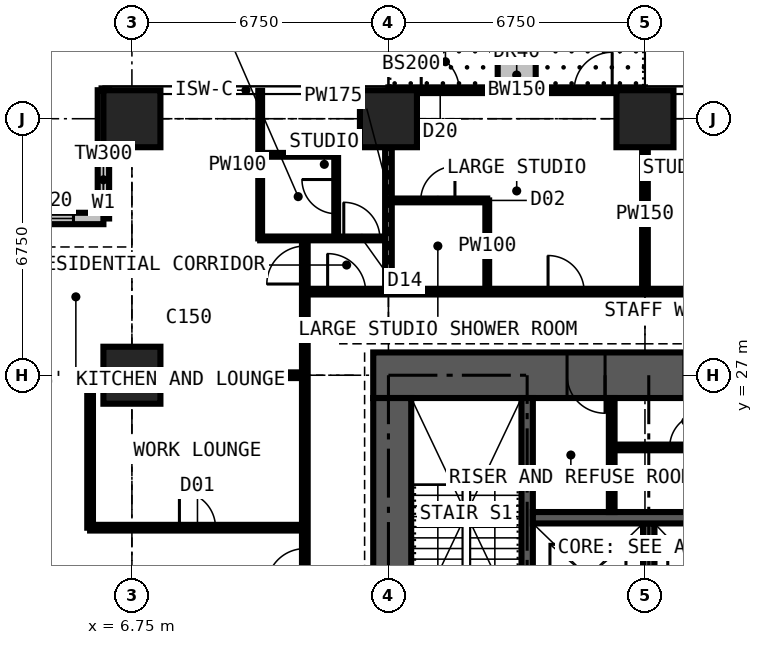
"""IFC4 building model, lengths in metres.
Left out: names, types, materials, properties, quantities, classifications, styles, units other than length and angle.
Written with IfcOpenShell. Run it as: python <this file> out.ifc"""

import sys

from ifc_helpers import new_model, si_unit, direction, frame, frame_2d, origin, origin_2d, place, context, subcontext, project, spatial, rectangle, extrude, element, fill, save


model = new_model("IFC4")
c1 = context("Model", 3, precision=1e-05, world=origin(), true_north=direction((0.0, 1.0)))
c2 = subcontext(c1, "Body", "Model", "MODEL_VIEW")
j1 = project(units=[si_unit("LENGTHUNIT", "METRE"), si_unit("PLANEANGLEUNIT", "RADIAN")], contexts=[c1])
p1 = place(None, origin())
s1 = spatial("IfcSite", under=j1, at=p1, CompositionType="ELEMENT")
p2 = place(p1, origin())
s2 = spatial("IfcBuilding", under=s1, at=p2, CompositionType="ELEMENT")
p3 = place(p2, frame((0.0, 0.0, 149.4)))
s3 = spatial("IfcBuildingStorey", under=s2, at=p3, CompositionType="ELEMENT", Elevation=149.4)
for number, where, z_axis, x_axis in (
    (1, (6.75, 27.0, 0.0), (0.0, 0.0, 1.0), (1.0, 0.0, 0.0)),
    (2, (6.75, 33.75, 0.0), (0.0, 0.0, 1.0), (1.0, 0.0, 0.0)),
    (3, (13.5, 33.75, 0.0), (0.0, 0.0, 1.0), (1.0, 0.0, 0.0)),
    (4, (20.25, 33.75, 0.0), (0.0, 0.0, 1.0), (1.0, 0.0, 0.0)),
):
    element("IfcColumn", number, at=place(p3, frame(where, z_axis=z_axis, x_axis=x_axis)), inside=s3, PredefinedType="COLUMN", context=c2, shape_type="SweptSolid", body=[
        extrude(rectangle(XDim=1.5, YDim=1.5, at=origin_2d()), origin(), (0.0, 0.0, 1.0), 3.6),
    ])
p4 = place(p3, frame((27.4, 27.0, 0.0), z_axis=(0.0, 0.0, 1.0), x_axis=(-1.0, 0.0, 0.0)))
e5 = element("IfcWall", 5, at=p4, inside=s3, PredefinedType="SHEAR", context=c2, shape_type="SweptSolid", body=[
    extrude(rectangle(XDim=14.3, YDim=1.2, at=frame_2d((7.15, 0.0))), origin(), (0.0, 0.0, 1.0), 3.6),
])
p5 = place(p4, frame((5.225, 0.0, 0.0)))
e6 = element("IfcOpeningElement", 6, at=p5, cuts=e5, PredefinedType="OPENING", context=c2, shape_type="SweptSolid", body=[
    extrude(rectangle(XDim=0.9, YDim=2.2, at=frame_2d((0.45, 1.1))), frame((0.0, 0.61, 0.0), z_axis=(0.0, -1.0, 0.0), x_axis=(1.0, 0.0, 0.0)), (0.0, 0.0, 1.0), 1.22),
])
p6 = place(p4, frame((8.2, 0.0, 0.0)))
e7 = element("IfcOpeningElement", 7, at=p6, cuts=e5, PredefinedType="OPENING", context=c2, shape_type="SweptSolid", body=[
    extrude(rectangle(XDim=1.0, YDim=2.2, at=frame_2d((0.5, 1.1))), frame((0.0, 0.61, 0.0), z_axis=(0.0, -1.0, 0.0), x_axis=(1.0, 0.0, 0.0)), (0.0, 0.0, 1.0), 1.22),
])
p7 = place(p3, frame((13.6, 26.4, 0.0), z_axis=(0.0, 0.0, 1.0), x_axis=(0.0, -1.0, 0.0)))
e8 = element("IfcWall", 8, at=p7, inside=s3, PredefinedType="SHEAR", context=c2, shape_type="SweptSolid", body=[
    extrude(rectangle(XDim=12.3, YDim=1.0, at=frame_2d((6.15, 0.0))), origin(), (0.0, 0.0, 1.0), 3.6),
])
p8 = place(p7, frame((7.45, 0.0, 0.0)))
e9 = element("IfcOpeningElement", 9, at=p8, cuts=e8, PredefinedType="OPENING", context=c2, shape_type="SweptSolid", body=[
    extrude(rectangle(XDim=1.2, YDim=2.2, at=frame_2d((0.6, 1.1))), frame((0.0, 0.51, 0.0), z_axis=(0.0, -1.0, 0.0), x_axis=(1.0, 0.0, 0.0)), (0.0, 0.0, 1.0), 1.02),
])
p9 = place(p3, frame((13.5, 34.5, 0.0), z_axis=(0.0, 0.0, 1.0), x_axis=(1.0, 0.0, 0.0)))
e10 = element("IfcWall", 10, at=p9, inside=s3, PredefinedType="SOLIDWALL", context=c2, shape_type="SweptSolid", body=[
    extrude(rectangle(XDim=6.75, YDim=0.15, at=frame_2d((3.375, 0.0))), origin(), (0.0, 0.0, 1.0), 3.375),
])
p10 = place(p9, frame((0.863, 0.0, 0.0)))
e11 = element("IfcOpeningElement", 11, at=p10, cuts=e10, PredefinedType="OPENING", context=c2, shape_type="SweptSolid", body=[
    extrude(rectangle(XDim=1.0, YDim=2.2, at=frame_2d((0.5, 1.1))), frame((0.0, 0.085, 0.0), z_axis=(0.0, -1.0, 0.0), x_axis=(1.0, 0.0, 0.0)), (0.0, 0.0, 1.0), 0.17),
])
p11 = place(p9, frame((1.975, 0.0, 0.9)))
e12 = element("IfcOpeningElement", 12, at=p11, cuts=e10, PredefinedType="OPENING", context=c2, shape_type="SweptSolid", body=[
    extrude(rectangle(XDim=1.2, YDim=1.8, at=frame_2d((0.6, 0.9))), frame((0.0, 0.085, 0.0), z_axis=(0.0, -1.0, 0.0), x_axis=(1.0, 0.0, 0.0)), (0.0, 0.0, 1.0), 0.17),
])
p12 = place(p9, frame((4.887, 0.0, 0.0)))
e13 = element("IfcOpeningElement", 13, at=p12, cuts=e10, PredefinedType="OPENING", context=c2, shape_type="SweptSolid", body=[
    extrude(rectangle(XDim=1.0, YDim=2.2, at=frame_2d((0.5, 1.1))), frame((0.0, 0.085, 0.0), z_axis=(0.0, -1.0, 0.0), x_axis=(1.0, 0.0, 0.0)), (0.0, 0.0, 1.0), 0.17),
])
p13 = place(p9, frame((3.575, 0.0, 0.9)))
e14 = element("IfcOpeningElement", 14, at=p13, cuts=e10, PredefinedType="OPENING", context=c2, shape_type="SweptSolid", body=[
    extrude(rectangle(XDim=1.2, YDim=1.8, at=frame_2d((0.6, 0.9))), frame((0.0, 0.085, 0.0), z_axis=(0.0, -1.0, 0.0), x_axis=(1.0, 0.0, 0.0)), (0.0, 0.0, 1.0), 0.17),
])
p14 = place(p3, frame((6.0, 34.5, 0.0), z_axis=(0.0, 0.0, 1.0), x_axis=(0.0, -1.0, 0.0)))
e15 = element("IfcWall", 15, at=p14, inside=s3, PredefinedType="SOLIDWALL", context=c2, shape_type="SweptSolid", body=[
    extrude(rectangle(XDim=3.375, YDim=0.3, at=frame_2d((1.688, 0.0))), origin(), (0.0, 0.0, 1.0), 3.375),
])
p15 = place(p14, frame((1.607, 0.0, 0.9)))
e16 = element("IfcOpeningElement", 16, at=p15, cuts=e15, PredefinedType="OPENING", context=c2, shape_type="SweptSolid", body=[
    extrude(rectangle(XDim=1.5, YDim=1.8, at=frame_2d((0.75, 0.9))), frame((0.0, 0.16, 0.0), z_axis=(0.0, -1.0, 0.0), x_axis=(1.0, 0.0, 0.0)), (0.0, 0.0, 1.0), 0.32),
])
p16 = place(p3, frame((6.0, 31.125, 0.0), z_axis=(0.0, 0.0, 1.0), x_axis=(-1.0, 0.0, 0.0)))
e17 = element("IfcWall", 17, at=p16, inside=s3, PredefinedType="SOLIDWALL", context=c2, shape_type="SweptSolid", body=[
    extrude(rectangle(XDim=3.375, YDim=0.3, at=frame_2d((1.688, 0.0))), origin(), (0.0, 0.0, 1.0), 3.375),
])
p17 = place(p16, frame((0.788, 0.0, 0.6)))
e18 = element("IfcOpeningElement", 18, at=p17, cuts=e17, PredefinedType="OPENING", context=c2, shape_type="SweptSolid", body=[
    extrude(rectangle(XDim=1.8, YDim=2.1, at=frame_2d((0.9, 1.05))), frame((0.0, 0.16, 0.0), z_axis=(0.0, -1.0, 0.0), x_axis=(1.0, 0.0, 0.0)), (0.0, 0.0, 1.0), 0.32),
])
p18 = place(p3, frame((16.875, 34.6, 0.0), z_axis=(0.0, 0.0, 1.0), x_axis=(0.0, 1.0, 0.0)))
e19 = element("IfcWall", 19, at=p18, inside=s3, PredefinedType="USERDEFINED", context=c2, shape_type="SweptSolid", body=[
    extrude(rectangle(XDim=2.2, YDim=1.0, at=frame_2d((1.1, 0.0))), origin(), (0.0, 0.0, 1.0), 0.9),
])
p19 = place(p3, frame((17.15, 20.3, 0.0), z_axis=(0.0, 0.0, 1.0), x_axis=(0.0, 1.0, 0.0)))
e20 = element("IfcWall", 20, at=p19, inside=s3, PredefinedType="SHEAR", context=c2, shape_type="SweptSolid", body=[
    extrude(rectangle(XDim=6.1, YDim=0.3, at=frame_2d((3.05, 0.0))), origin(), (0.0, 0.0, 1.0), 3.6),
])
p20 = place(p3, frame((20.35, 20.3, 0.0), z_axis=(0.0, 0.0, 1.0), x_axis=(0.0, 1.0, 0.0)))
e21 = element("IfcWall", 21, at=p20, inside=s3, PredefinedType="SHEAR", context=c2, shape_type="SweptSolid", body=[
    extrude(rectangle(XDim=2.8, YDim=0.3, at=frame_2d((1.4, 0.0))), origin(), (0.0, 0.0, 1.0), 3.6),
])
p21 = place(p3, frame((17.3, 23.25, 0.0), z_axis=(0.0, 0.0, 1.0), x_axis=(1.0, 0.0, 0.0)))
e22 = element("IfcWall", 22, at=p21, inside=s3, PredefinedType="SHEAR", context=c2, shape_type="SweptSolid", body=[
    extrude(rectangle(XDim=5.9, YDim=0.3, at=frame_2d((2.95, 0.0))), origin(), (0.0, 0.0, 1.0), 3.6),
])
p22 = place(p3, frame((19.375, 23.4, 0.0), z_axis=(0.0, 0.0, 1.0), x_axis=(0.0, 1.0, 0.0)))
e23 = element("IfcWall", 23, at=p22, inside=s3, PredefinedType="PARTITIONING", context=c2, shape_type="SweptSolid", body=[
    extrude(rectangle(XDim=3.0, YDim=0.15, at=frame_2d((1.5, 0.0))), origin(), (0.0, 0.0, 1.0), 3.375),
])
p23 = place(p3, frame((19.45, 25.1, 0.0), z_axis=(0.0, 0.0, 1.0), x_axis=(1.0, 0.0, 0.0)))
e24 = element("IfcWall", 24, at=p23, inside=s3, PredefinedType="PARTITIONING", context=c2, shape_type="SweptSolid", body=[
    extrude(rectangle(XDim=3.75, YDim=0.15, at=frame_2d((1.875, 0.0))), origin(), (0.0, 0.0, 1.0), 3.375),
])
p24 = place(p23, frame((1.45, 0.0, 0.0)))
e25 = element("IfcOpeningElement", 25, at=p24, cuts=e24, PredefinedType="OPENING", context=c2, shape_type="SweptSolid", body=[
    extrude(rectangle(XDim=0.9, YDim=2.2, at=frame_2d((0.45, 1.1))), frame((0.0, 0.085, 0.0), z_axis=(0.0, -1.0, 0.0), x_axis=(1.0, 0.0, 0.0)), (0.0, 0.0, 1.0), 0.17),
])
p25 = place(p3, frame((4.15, 27.0, 0.0), z_axis=(0.0, 0.0, 1.0), x_axis=(1.0, 0.0, 0.0)))
e26 = element("IfcWall", 26, at=p25, inside=s3, PredefinedType="PARTITIONING", context=c2, shape_type="SweptSolid", body=[
    extrude(rectangle(XDim=7.15, YDim=0.15, at=frame_2d((3.575, 0.0))), origin(), (0.0, 0.0, 1.0), 2.806),
])
p26 = place(p3, frame((5.65, 22.988, 0.0), z_axis=(0.0, 0.0, 1.0), x_axis=(0.0, 1.0, 0.0)))
e27 = element("IfcWall", 27, at=p26, inside=s3, PredefinedType="PARTITIONING", context=c2, shape_type="SweptSolid", body=[
    extrude(rectangle(XDim=4.012, YDim=0.15, at=frame_2d((2.006, 0.0))), origin(), (0.0, 0.0, 1.0), 3.375),
])
p27 = place(p3, frame((5.65, 22.988, 0.0), z_axis=(0.0, 0.0, 1.0), x_axis=(1.0, 0.0, 0.0)))
e28 = element("IfcWall", 28, at=p27, inside=s3, PredefinedType="PARTITIONING", context=c2, shape_type="SweptSolid", body=[
    extrude(rectangle(XDim=5.65, YDim=0.15, at=frame_2d((2.825, 0.0))), origin(), (0.0, 0.0, 1.0), 3.375),
])
p28 = place(p27, frame((2.35, 0.0, 0.0)))
e29 = element("IfcOpeningElement", 29, at=p28, cuts=e28, PredefinedType="OPENING", context=c2, shape_type="SweptSolid", body=[
    extrude(rectangle(XDim=0.95, YDim=2.2, at=frame_2d((0.475, 1.1))), frame((0.0, 0.085, 0.0), z_axis=(0.0, -1.0, 0.0), x_axis=(1.0, 0.0, 0.0)), (0.0, 0.0, 1.0), 0.17),
])
p29 = place(p3, frame((10.125, 30.6, 0.0), z_axis=(0.0, 0.0, 1.0), x_axis=(0.0, 1.0, 0.0)))
e30 = element("IfcWall", 30, at=p29, inside=s3, PredefinedType="PARTITIONING", context=c2, shape_type="SweptSolid", body=[
    extrude(rectangle(XDim=3.884, YDim=0.1, at=frame_2d((1.942, 0.0))), origin(), (0.0, 0.0, 1.0), 3.375),
])
p30 = place(p3, frame((10.125, 30.6, 0.0), z_axis=(0.0, 0.0, 1.0), x_axis=(1.0, 0.0, 0.0)))
e31 = element("IfcWall", 31, at=p30, inside=s3, PredefinedType="PARTITIONING", context=c2, shape_type="SweptSolid", body=[
    extrude(rectangle(XDim=3.375, YDim=0.1, at=frame_2d((1.688, 0.0))), origin(), (0.0, 0.0, 1.0), 3.375),
])
p31 = place(p30, frame((2.2, 0.0, 0.0)))
e32 = element("IfcOpeningElement", 32, at=p31, cuts=e31, PredefinedType="OPENING", context=c2, shape_type="SweptSolid", body=[
    extrude(rectangle(XDim=0.95, YDim=2.2, at=frame_2d((0.475, 1.1))), frame((0.0, 0.06, 0.0), z_axis=(0.0, -1.0, 0.0), x_axis=(1.0, 0.0, 0.0)), (0.0, 0.0, 1.0), 0.12),
])
p32 = place(p3, frame((10.125, 32.8, 0.0), z_axis=(0.0, 0.0, 1.0), x_axis=(1.0, 0.0, 0.0)))
e33 = element("IfcWall", 33, at=p32, inside=s3, PredefinedType="PARTITIONING", context=c2, shape_type="SweptSolid", body=[
    extrude(rectangle(XDim=2.0, YDim=0.1, at=frame_2d((1.0, 0.0))), origin(), (0.0, 0.0, 1.0), 3.375),
])
p33 = place(p3, frame((11.3, 11.3, 0.0), z_axis=(0.0, 0.0, 1.0), x_axis=(0.0, 1.0, 0.0)))
e34 = element("IfcWall", 34, at=p33, inside=s3, PredefinedType="PARTITIONING", context=c2, shape_type="SweptSolid", body=[
    extrude(rectangle(XDim=19.3, YDim=0.15, at=frame_2d((9.65, 0.0))), origin(), (0.0, 0.0, 1.0), 3.375),
])
p34 = place(p33, frame((18.1, 0.0, 0.0)))
e35 = element("IfcOpeningElement", 35, at=p34, cuts=e34, PredefinedType="OPENING", context=c2, shape_type="SweptSolid", body=[
    extrude(rectangle(XDim=1.0, YDim=2.2, at=frame_2d((0.5, 1.1))), frame((0.0, 0.085, 0.0), z_axis=(0.0, -1.0, 0.0), x_axis=(1.0, 0.0, 0.0)), (0.0, 0.0, 1.0), 0.17),
])
p35 = place(p33, frame((10.137, 0.0, 0.0)))
e36 = element("IfcOpeningElement", 36, at=p35, cuts=e34, PredefinedType="OPENING", context=c2, shape_type="SweptSolid", body=[
    extrude(rectangle(XDim=1.0, YDim=2.2, at=frame_2d((0.5, 1.1))), frame((0.0, 0.085, 0.0), z_axis=(0.0, -1.0, 0.0), x_axis=(1.0, 0.0, 0.0)), (0.0, 0.0, 1.0), 0.17),
])
p36 = place(p3, frame((11.3, 29.2, 0.0), z_axis=(0.0, 0.0, 1.0), x_axis=(1.0, 0.0, 0.0)))
e37 = element("IfcWall", 37, at=p36, inside=s3, PredefinedType="PARTITIONING", context=c2, shape_type="SweptSolid", body=[
    extrude(rectangle(XDim=19.809, YDim=0.15, at=frame_2d((9.904, 0.0))), origin(), (0.0, 0.0, 1.0), 3.375),
])
p37 = place(p36, frame((12.9, 0.0, 0.0)))
e38 = element("IfcOpeningElement", 38, at=p37, cuts=e37, PredefinedType="OPENING", context=c2, shape_type="SweptSolid", body=[
    extrude(rectangle(XDim=1.0, YDim=2.2, at=frame_2d((0.5, 1.1))), frame((0.0, 0.085, 0.0), z_axis=(0.0, -1.0, 0.0), x_axis=(1.0, 0.0, 0.0)), (0.0, 0.0, 1.0), 0.17),
])
p38 = place(p36, frame((6.4, 0.0, 0.0)))
e39 = element("IfcOpeningElement", 39, at=p38, cuts=e37, PredefinedType="OPENING", context=c2, shape_type="SweptSolid", body=[
    extrude(rectangle(XDim=0.95, YDim=2.2, at=frame_2d((0.475, 1.1))), frame((0.0, 0.085, 0.0), z_axis=(0.0, -1.0, 0.0), x_axis=(1.0, 0.0, 0.0)), (0.0, 0.0, 1.0), 0.17),
])
p39 = place(p36, frame((0.6, 0.0, 0.0)))
e40 = element("IfcOpeningElement", 40, at=p39, cuts=e37, PredefinedType="OPENING", context=c2, shape_type="SweptSolid", body=[
    extrude(rectangle(XDim=1.0, YDim=2.2, at=frame_2d((0.5, 1.1))), frame((0.0, 0.085, 0.0), z_axis=(0.0, -1.0, 0.0), x_axis=(1.0, 0.0, 0.0)), (0.0, 0.0, 1.0), 0.17),
])
p40 = place(p3, frame((12.125, 30.6, 0.0), z_axis=(0.0, 0.0, 1.0), x_axis=(0.0, 1.0, 0.0)))
e41 = element("IfcWall", 41, at=p40, inside=s3, PredefinedType="PARTITIONING", context=c2, shape_type="SweptSolid", body=[
    extrude(rectangle(XDim=2.2, YDim=0.1, at=frame_2d((1.1, 0.0))), origin(), (0.0, 0.0, 1.0), 3.375),
])
p41 = place(p40, frame((0.65, 0.0, 0.0)))
e42 = element("IfcOpeningElement", 42, at=p41, cuts=e41, PredefinedType="OPENING", context=c2, shape_type="SweptSolid", body=[
    extrude(rectangle(XDim=0.9, YDim=2.2, at=frame_2d((0.45, 1.1))), frame((0.0, 0.06, 0.0), z_axis=(0.0, -1.0, 0.0), x_axis=(1.0, 0.0, 0.0)), (0.0, 0.0, 1.0), 0.12),
])
p42 = place(p3, frame((13.5, 29.2, 0.0), z_axis=(0.0, 0.0, 1.0), x_axis=(0.0, 1.0, 0.0)))
e43 = element("IfcWall", 43, at=p42, inside=s3, PredefinedType="PARTITIONING", context=c2, shape_type="SweptSolid", body=[
    extrude(rectangle(XDim=5.284, YDim=0.175, at=frame_2d((2.642, 0.0))), origin(), (0.0, 0.0, 1.0), 2.806),
])
p43 = place(p3, frame((13.5, 31.6, 0.0), z_axis=(0.0, 0.0, 1.0), x_axis=(1.0, 0.0, 0.0)))
e44 = element("IfcWall", 44, at=p43, inside=s3, PredefinedType="PARTITIONING", context=c2, shape_type="SweptSolid", body=[
    extrude(rectangle(XDim=2.6, YDim=0.1, at=frame_2d((1.3, 0.0))), origin(), (0.0, 0.0, 1.0), 3.375),
])
p44 = place(p43, frame((0.85, 0.0, 0.0)))
e45 = element("IfcOpeningElement", 45, at=p44, cuts=e44, PredefinedType="OPENING", context=c2, shape_type="SweptSolid", body=[
    extrude(rectangle(XDim=0.9, YDim=2.2, at=frame_2d((0.45, 1.1))), frame((0.0, 0.06, 0.0), z_axis=(0.0, -1.0, 0.0), x_axis=(1.0, 0.0, 0.0)), (0.0, 0.0, 1.0), 0.12),
])
p45 = place(p3, frame((16.1, 29.2, 0.0), z_axis=(0.0, 0.0, 1.0), x_axis=(0.0, 1.0, 0.0)))
e46 = element("IfcWall", 46, at=p45, inside=s3, PredefinedType="PARTITIONING", context=c2, shape_type="SweptSolid", body=[
    extrude(rectangle(XDim=2.4, YDim=0.1, at=frame_2d((1.2, 0.0))), origin(), (0.0, 0.0, 1.0), 3.375),
])
p46 = place(p3, frame((20.25, 29.2, 0.0), z_axis=(0.0, 0.0, 1.0), x_axis=(0.0, 1.0, 0.0)))
e47 = element("IfcWall", 47, at=p46, inside=s3, PredefinedType="PARTITIONING", context=c2, shape_type="SweptSolid", body=[
    extrude(rectangle(XDim=5.284, YDim=0.15, at=frame_2d((2.642, 0.0))), origin(), (0.0, 0.0, 1.0), 2.806),
])
p47 = place(p10, origin())
e48 = element("IfcDoor", 48, at=p47, inside=s3, OperationType="SINGLE_SWING_LEFT", PredefinedType="DOOR", context=c2, shape_type="SweptSolid", body=[
    extrude(rectangle(XDim=1.0, YDim=2.2, at=frame_2d((0.5, 1.1))), frame((0.0, 0.025, 0.0), z_axis=(0.0, -1.0, 0.0), x_axis=(1.0, 0.0, 0.0)), (0.0, 0.0, 1.0), 0.05),
])
fill(e11, e48)
p48 = place(p11, origin())
e49 = element("IfcWindow", 49, at=p48, inside=s3, PartitioningType="SINGLE_PANEL", PredefinedType="WINDOW", context=c2, shape_type="SweptSolid", body=[
    extrude(rectangle(XDim=1.2, YDim=1.8, at=frame_2d((0.6, 0.9))), frame((0.0, 0.03, 0.0), z_axis=(0.0, -1.0, 0.0), x_axis=(1.0, 0.0, 0.0)), (0.0, 0.0, 1.0), 0.06),
])
fill(e12, e49)
p49 = place(p12, origin())
e50 = element("IfcDoor", 50, at=p49, inside=s3, OperationType="SINGLE_SWING_RIGHT", PredefinedType="DOOR", context=c2, shape_type="SweptSolid", body=[
    extrude(rectangle(XDim=1.0, YDim=2.2, at=frame_2d((0.5, 1.1))), frame((0.0, 0.025, 0.0), z_axis=(0.0, -1.0, 0.0), x_axis=(1.0, 0.0, 0.0)), (0.0, 0.0, 1.0), 0.05),
])
fill(e13, e50)
p50 = place(p13, origin())
e51 = element("IfcWindow", 51, at=p50, inside=s3, PartitioningType="SINGLE_PANEL", PredefinedType="WINDOW", context=c2, shape_type="SweptSolid", body=[
    extrude(rectangle(XDim=1.2, YDim=1.8, at=frame_2d((0.6, 0.9))), frame((0.0, 0.03, 0.0), z_axis=(0.0, -1.0, 0.0), x_axis=(1.0, 0.0, 0.0)), (0.0, 0.0, 1.0), 0.06),
])
fill(e14, e51)
p51 = place(p15, origin())
e52 = element("IfcWindow", 52, at=p51, inside=s3, PartitioningType="SINGLE_PANEL", PredefinedType="WINDOW", context=c2, shape_type="SweptSolid", body=[
    extrude(rectangle(XDim=1.5, YDim=1.8, at=frame_2d((0.75, 0.9))), frame((0.0, 0.03, 0.0), z_axis=(0.0, -1.0, 0.0), x_axis=(1.0, 0.0, 0.0)), (0.0, 0.0, 1.0), 0.06),
])
fill(e16, e52)
p52 = place(p17, origin())
e53 = element("IfcWindow", 53, at=p52, inside=s3, PartitioningType="SINGLE_PANEL", PredefinedType="WINDOW", context=c2, shape_type="SweptSolid", body=[
    extrude(rectangle(XDim=1.8, YDim=2.1, at=frame_2d((0.9, 1.05))), frame((0.0, 0.03, 0.0), z_axis=(0.0, -1.0, 0.0), x_axis=(1.0, 0.0, 0.0)), (0.0, 0.0, 1.0), 0.06),
])
fill(e18, e53)
p53 = place(p24, origin())
e54 = element("IfcDoor", 54, at=p53, inside=s3, OperationType="SINGLE_SWING_RIGHT", PredefinedType="DOOR", context=c2, shape_type="SweptSolid", body=[
    extrude(rectangle(XDim=0.9, YDim=2.2, at=frame_2d((0.45, 1.1))), frame((0.0, 0.025, 0.0), z_axis=(0.0, -1.0, 0.0), x_axis=(1.0, 0.0, 0.0)), (0.0, 0.0, 1.0), 0.05),
])
fill(e25, e54)
p54 = place(p6, origin())
e55 = element("IfcDoor", 55, at=p54, inside=s3, OperationType="SINGLE_SWING_LEFT", PredefinedType="DOOR", context=c2, shape_type="SweptSolid", body=[
    extrude(rectangle(XDim=1.0, YDim=2.2, at=frame_2d((0.5, 1.1))), frame((0.0, 0.025, 0.0), z_axis=(0.0, -1.0, 0.0), x_axis=(1.0, 0.0, 0.0)), (0.0, 0.0, 1.0), 0.05),
])
fill(e7, e55)
p55 = place(p38, origin())
e56 = element("IfcDoor", 56, at=p55, inside=s3, OperationType="SINGLE_SWING_LEFT", PredefinedType="DOOR", context=c2, shape_type="SweptSolid", body=[
    extrude(rectangle(XDim=0.95, YDim=2.2, at=frame_2d((0.475, 1.1))), frame((0.0, 0.025, 0.0), z_axis=(0.0, -1.0, 0.0), x_axis=(1.0, 0.0, 0.0)), (0.0, 0.0, 1.0), 0.05),
])
fill(e39, e56)
p56 = place(p44, origin())
e57 = element("IfcDoor", 57, at=p56, inside=s3, OperationType="SINGLE_SWING_RIGHT", PredefinedType="DOOR", context=c2, shape_type="SweptSolid", body=[
    extrude(rectangle(XDim=0.9, YDim=2.2, at=frame_2d((0.45, 1.1))), frame((0.0, 0.025, 0.0), z_axis=(0.0, -1.0, 0.0), x_axis=(1.0, 0.0, 0.0)), (0.0, 0.0, 1.0), 0.05),
])
fill(e45, e57)
p57 = place(p31, origin())
e58 = element("IfcDoor", 58, at=p57, inside=s3, OperationType="SINGLE_SWING_LEFT", PredefinedType="DOOR", context=c2, shape_type="SweptSolid", body=[
    extrude(rectangle(XDim=0.95, YDim=2.2, at=frame_2d((0.475, 1.1))), frame((0.0, 0.025, 0.0), z_axis=(0.0, -1.0, 0.0), x_axis=(1.0, 0.0, 0.0)), (0.0, 0.0, 1.0), 0.05),
])
fill(e32, e58)
p58 = place(p41, origin())
e59 = element("IfcDoor", 59, at=p58, inside=s3, OperationType="SINGLE_SWING_RIGHT", PredefinedType="DOOR", context=c2, shape_type="SweptSolid", body=[
    extrude(rectangle(XDim=0.9, YDim=2.2, at=frame_2d((0.45, 1.1))), frame((0.0, 0.025, 0.0), z_axis=(0.0, -1.0, 0.0), x_axis=(1.0, 0.0, 0.0)), (0.0, 0.0, 1.0), 0.05),
])
fill(e42, e59)
p59 = place(p39, origin())
e60 = element("IfcDoor", 60, at=p59, inside=s3, OperationType="SINGLE_SWING_LEFT", PredefinedType="DOOR", context=c2, shape_type="SweptSolid", body=[
    extrude(rectangle(XDim=1.0, YDim=2.2, at=frame_2d((0.5, 1.1))), frame((0.0, 0.025, 0.0), z_axis=(0.0, -1.0, 0.0), x_axis=(1.0, 0.0, 0.0)), (0.0, 0.0, 1.0), 0.05),
])
fill(e40, e60)
p60 = place(p34, origin())
e61 = element("IfcDoor", 61, at=p60, inside=s3, OperationType="SINGLE_SWING_LEFT", PredefinedType="DOOR", context=c2, shape_type="SweptSolid", body=[
    extrude(rectangle(XDim=1.0, YDim=2.2, at=frame_2d((0.5, 1.1))), frame((0.0, 0.025, 0.0), z_axis=(0.0, -1.0, 0.0), x_axis=(1.0, 0.0, 0.0)), (0.0, 0.0, 1.0), 0.05),
])
fill(e35, e61)
p61 = place(p35, origin())
e62 = element("IfcDoor", 62, at=p61, inside=s3, OperationType="SINGLE_SWING_LEFT", PredefinedType="DOOR", context=c2, shape_type="SweptSolid", body=[
    extrude(rectangle(XDim=1.0, YDim=2.2, at=frame_2d((0.5, 1.1))), frame((0.0, 0.025, 0.0), z_axis=(0.0, -1.0, 0.0), x_axis=(1.0, 0.0, 0.0)), (0.0, 0.0, 1.0), 0.05),
])
fill(e36, e62)
p62 = place(p28, origin())
e63 = element("IfcDoor", 63, at=p62, inside=s3, OperationType="SINGLE_SWING_LEFT", PredefinedType="DOOR", context=c2, shape_type="SweptSolid", body=[
    extrude(rectangle(XDim=0.95, YDim=2.2, at=frame_2d((0.475, 1.1))), frame((0.0, 0.025, 0.0), z_axis=(0.0, -1.0, 0.0), x_axis=(1.0, 0.0, 0.0)), (0.0, 0.0, 1.0), 0.05),
])
fill(e29, e63)
save(model, sys.argv[1])
